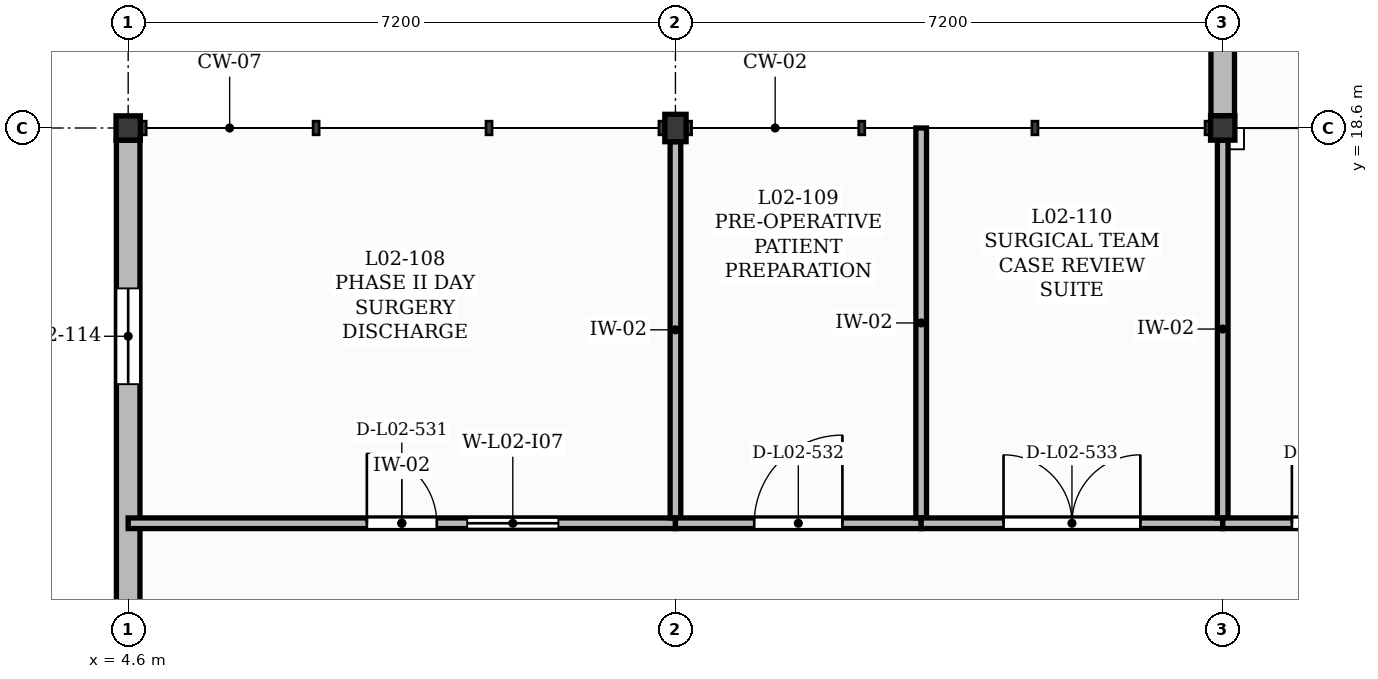
"""IFC4 building model, lengths in metres.
Left out: names, types, materials, properties, quantities, classifications, styles, units other than length and angle.
Written with IfcOpenShell. Run it as: python <this file> out.ifc"""

import sys

from ifc_helpers import new_model, si_unit, direction, frame, frame_2d, origin, origin_2d, place, context, subcontext, project, spatial, rectangle, extrude, element, fill, save


model = new_model("IFC4")
c1 = context("Model", 3, precision=1e-05, world=origin(), true_north=direction((0.0, 1.0)))
c2 = subcontext(c1, "Body", "Model", "MODEL_VIEW")
j1 = project(units=[si_unit("LENGTHUNIT", "METRE"), si_unit("PLANEANGLEUNIT", "RADIAN")], contexts=[c1])
p1 = place(None, origin())
s1 = spatial("IfcSite", under=j1, at=p1, CompositionType="ELEMENT")
p2 = place(p1, origin())
s2 = spatial("IfcBuilding", under=s1, at=p2, CompositionType="ELEMENT")
p3 = place(p2, frame((0.0, 0.0, 9.0)))
s3 = spatial("IfcBuildingStorey", under=s2, at=p3, CompositionType="ELEMENT", Elevation=9.0)
p4 = place(p3, frame((4.6, 18.6, 0.0), z_axis=(0.0, 0.0, 1.0), x_axis=(1.0, 0.0, 0.0)))
e1 = element("IfcColumn", 1, at=p4, inside=s3, PredefinedType="COLUMN", context=c2, shape_type="SweptSolid", body=[
    extrude(rectangle(XDim=0.32, YDim=0.32, at=origin_2d()), origin(), (0.0, 0.0, 1.0), 3.95),
])
p5 = place(p3, frame((11.8, 18.6, 0.0), z_axis=(0.0, 0.0, 1.0), x_axis=(1.0, 0.0, 0.0)))
e2 = element("IfcColumn", 2, at=p5, inside=s3, PredefinedType="COLUMN", context=c2, shape_type="SweptSolid", body=[
    extrude(rectangle(XDim=0.28, YDim=0.36, at=origin_2d()), origin(), (0.0, 0.0, 1.0), 3.95),
])
p6 = place(p3, frame((19.0, 18.6, 0.0), z_axis=(0.0, 0.0, 1.0), x_axis=(1.0, 0.0, 0.0)))
e3 = element("IfcColumn", 3, at=p6, inside=s3, PredefinedType="COLUMN", context=c2, shape_type="SweptSolid", body=[
    extrude(rectangle(XDim=0.32, YDim=0.32, at=origin_2d()), origin(), (0.0, 0.0, 1.0), 3.95),
])
p7 = place(p3, frame((4.6, 11.58, 0.0), z_axis=(0.0, 0.0, 1.0), x_axis=(0.0, 1.0, 0.0)))
e4 = element("IfcWall", 4, at=p7, inside=s3, PredefinedType="SOLIDWALL", context=c2, shape_type="SweptSolid", body=[
    extrude(rectangle(XDim=6.86, YDim=0.31, at=frame_2d((3.43, 0.0))), origin(), (0.0, 0.0, 1.0), 3.49),
])
p8 = place(p7, frame((3.65, 0.0, 1.05)))
e5 = element("IfcOpeningElement", 5, at=p8, cuts=e4, PredefinedType="OPENING", context=c2, shape_type="SweptSolid", body=[
    extrude(rectangle(XDim=1.26, YDim=1.65, at=frame_2d((0.63, 0.825))), frame((0.0, 0.165, 0.0), z_axis=(0.0, -1.0, 0.0), x_axis=(1.0, 0.0, 0.0)), (0.0, 0.0, 1.0), 0.33),
])
p9 = place(p3, frame((19.0, 18.76, 0.0), z_axis=(0.0, 0.0, 1.0), x_axis=(0.0, 1.0, 0.0)))
e6 = element("IfcWall", 6, at=p9, inside=s3, PredefinedType="SOLIDWALL", context=c2, shape_type="SweptSolid", body=[
    extrude(rectangle(XDim=8.26, YDim=0.31, at=frame_2d((4.13, 0.0))), origin(), (0.0, 0.0, 1.0), 3.49),
])
p10 = place(p9, frame((2.54, 0.0, 1.35)))
e7 = element("IfcOpeningElement", 7, at=p10, cuts=e6, PredefinedType="OPENING", context=c2, shape_type="SweptSolid", body=[
    extrude(rectangle(XDim=1.25, YDim=1.4, at=frame_2d((0.625, 0.7))), frame((0.0, 0.165, 0.0), z_axis=(0.0, -1.0, 0.0), x_axis=(1.0, 0.0, 0.0)), (0.0, 0.0, 1.0), 0.33),
])
p11 = place(p9, frame((4.47, 0.0, 1.35)))
e8 = element("IfcOpeningElement", 8, at=p11, cuts=e6, PredefinedType="OPENING", context=c2, shape_type="SweptSolid", body=[
    extrude(rectangle(XDim=1.25, YDim=1.4, at=frame_2d((0.625, 0.7))), frame((0.0, 0.165, 0.0), z_axis=(0.0, -1.0, 0.0), x_axis=(1.0, 0.0, 0.0)), (0.0, 0.0, 1.0), 0.33),
])
p12 = place(p3, frame((4.6, 13.4, 0.0), z_axis=(0.0, 0.0, 1.0), x_axis=(1.0, 0.0, 0.0)))
e9 = element("IfcWall", 9, at=p12, inside=s3, PredefinedType="PARTITIONING", context=c2, shape_type="SweptSolid", body=[
    extrude(rectangle(XDim=7.2, YDim=0.14, at=frame_2d((3.6, 0.0))), origin(), (0.0, 0.0, 1.0), 3.91),
])
p13 = place(p12, frame((3.14, 0.0, 0.0)))
e10 = element("IfcOpeningElement", 10, at=p13, cuts=e9, PredefinedType="OPENING", context=c2, shape_type="SweptSolid", body=[
    extrude(rectangle(XDim=0.92, YDim=2.1, at=frame_2d((0.46, 1.05))), frame((0.0, 0.08, 0.0), z_axis=(0.0, -1.0, 0.0), x_axis=(1.0, 0.0, 0.0)), (0.0, 0.0, 1.0), 0.16),
])
p14 = place(p12, frame((4.46, 0.0, 1.05)))
e11 = element("IfcOpeningElement", 11, at=p14, cuts=e9, PredefinedType="OPENING", context=c2, shape_type="SweptSolid", body=[
    extrude(rectangle(XDim=1.2, YDim=1.1, at=frame_2d((0.6, 0.55))), frame((0.0, 0.08, 0.0), z_axis=(0.0, -1.0, 0.0), x_axis=(1.0, 0.0, 0.0)), (0.0, 0.0, 1.0), 0.16),
])
p15 = place(p3, frame((11.8, 13.47, 0.0), z_axis=(0.0, 0.0, 1.0), x_axis=(0.0, 1.0, 0.0)))
e12 = element("IfcWall", 12, at=p15, inside=s3, PredefinedType="PARTITIONING", context=c2, shape_type="SweptSolid", body=[
    extrude(rectangle(XDim=4.95, YDim=0.14, at=frame_2d((2.475, 0.0))), origin(), (0.0, 0.0, 1.0), 3.49),
])
p16 = place(p3, frame((11.8, 13.4, 0.0), z_axis=(0.0, 0.0, 1.0), x_axis=(1.0, 0.0, 0.0)))
e13 = element("IfcWall", 13, at=p16, inside=s3, PredefinedType="PARTITIONING", context=c2, shape_type="SweptSolid", body=[
    extrude(rectangle(XDim=3.233, YDim=0.14, at=frame_2d((1.616, 0.0))), origin(), (0.0, 0.0, 1.0), 3.91),
])
p17 = place(p16, frame((1.037, 0.0, 0.0)))
e14 = element("IfcOpeningElement", 14, at=p17, cuts=e13, PredefinedType="OPENING", context=c2, shape_type="SweptSolid", body=[
    extrude(rectangle(XDim=1.16, YDim=2.1, at=frame_2d((0.58, 1.05))), frame((0.0, 0.08, 0.0), z_axis=(0.0, -1.0, 0.0), x_axis=(1.0, 0.0, 0.0)), (0.0, 0.0, 1.0), 0.16),
])
p18 = place(p3, frame((15.033, 13.47, 0.0), z_axis=(0.0, 0.0, 1.0), x_axis=(0.0, 1.0, 0.0)))
e15 = element("IfcWall", 15, at=p18, inside=s3, PredefinedType="PARTITIONING", context=c2, shape_type="SweptSolid", body=[
    extrude(rectangle(XDim=5.13, YDim=0.14, at=frame_2d((2.565, 0.0))), origin(), (0.0, 0.0, 1.0), 3.91),
])
p19 = place(p3, frame((15.033, 13.4, 0.0), z_axis=(0.0, 0.0, 1.0), x_axis=(1.0, 0.0, 0.0)))
e16 = element("IfcWall", 16, at=p19, inside=s3, PredefinedType="PARTITIONING", context=c2, shape_type="SweptSolid", body=[
    extrude(rectangle(XDim=3.967, YDim=0.14, at=frame_2d((1.983, 0.0))), origin(), (0.0, 0.0, 1.0), 3.91),
])
p20 = place(p19, frame((1.083, 0.0, 0.0)))
e17 = element("IfcOpeningElement", 17, at=p20, cuts=e16, PredefinedType="OPENING", context=c2, shape_type="SweptSolid", body=[
    extrude(rectangle(XDim=1.8, YDim=2.3, at=frame_2d((0.9, 1.15))), frame((0.0, 0.08, 0.0), z_axis=(0.0, -1.0, 0.0), x_axis=(1.0, 0.0, 0.0)), (0.0, 0.0, 1.0), 0.16),
])
p21 = place(p3, frame((19.0, 13.47, 0.0), z_axis=(0.0, 0.0, 1.0), x_axis=(0.0, 1.0, 0.0)))
e18 = element("IfcWall", 18, at=p21, inside=s3, PredefinedType="PARTITIONING", context=c2, shape_type="SweptSolid", body=[
    extrude(rectangle(XDim=4.97, YDim=0.14, at=frame_2d((2.485, 0.0))), origin(), (0.0, 0.0, 1.0), 3.49),
])
p22 = place(p3, frame((19.0, 13.4, 0.0), z_axis=(0.0, 0.0, 1.0), x_axis=(1.0, 0.0, 0.0)))
e19 = element("IfcWall", 19, at=p22, inside=s3, PredefinedType="PARTITIONING", context=c2, shape_type="SweptSolid", body=[
    extrude(rectangle(XDim=2.8, YDim=0.14, at=frame_2d((1.4, 0.0))), origin(), (0.0, 0.0, 1.0), 3.96),
])
p23 = place(p22, frame((0.91, 0.0, 0.0)))
e20 = element("IfcOpeningElement", 20, at=p23, cuts=e19, PredefinedType="OPENING", context=c2, shape_type="SweptSolid", body=[
    extrude(rectangle(XDim=0.98, YDim=2.15, at=frame_2d((0.49, 1.075))), frame((0.0, 0.08, 0.0), z_axis=(0.0, -1.0, 0.0), x_axis=(1.0, 0.0, 0.0)), (0.0, 0.0, 1.0), 0.16),
])
p24 = place(p8, origin())
e21 = element("IfcWindow", 21, at=p24, inside=s3, PartitioningType="SINGLE_PANEL", PredefinedType="WINDOW", context=c2, shape_type="SweptSolid", body=[
    extrude(rectangle(XDim=1.26, YDim=1.65, at=frame_2d((0.63, 0.825))), frame((0.0, 0.03, 0.0), z_axis=(0.0, -1.0, 0.0), x_axis=(1.0, 0.0, 0.0)), (0.0, 0.0, 1.0), 0.06),
])
fill(e5, e21)
p25 = place(p23, origin())
e22 = element("IfcDoor", 22, at=p25, inside=s3, OperationType="SINGLE_SWING_LEFT", PredefinedType="DOOR", context=c2, shape_type="SweptSolid", body=[
    extrude(rectangle(XDim=0.98, YDim=2.15, at=frame_2d((0.49, 1.075))), frame((0.0, 0.025, 0.0), z_axis=(0.0, -1.0, 0.0), x_axis=(1.0, 0.0, 0.0)), (0.0, 0.0, 1.0), 0.05),
])
fill(e20, e22)
p26 = place(p13, origin())
e23 = element("IfcDoor", 23, at=p26, inside=s3, OperationType="SINGLE_SWING_LEFT", PredefinedType="DOOR", context=c2, shape_type="SweptSolid", body=[
    extrude(rectangle(XDim=0.92, YDim=2.1, at=frame_2d((0.46, 1.05))), frame((0.0, 0.025, 0.0), z_axis=(0.0, -1.0, 0.0), x_axis=(1.0, 0.0, 0.0)), (0.0, 0.0, 1.0), 0.05),
])
fill(e10, e23)
p27 = place(p14, origin())
e24 = element("IfcWindow", 24, at=p27, inside=s3, PartitioningType="SINGLE_PANEL", PredefinedType="WINDOW", context=c2, shape_type="SweptSolid", body=[
    extrude(rectangle(XDim=1.2, YDim=1.1, at=frame_2d((0.6, 0.55))), frame((0.0, 0.03, 0.0), z_axis=(0.0, -1.0, 0.0), x_axis=(1.0, 0.0, 0.0)), (0.0, 0.0, 1.0), 0.06),
])
fill(e11, e24)
p28 = place(p17, origin())
e25 = element("IfcDoor", 25, at=p28, inside=s3, OperationType="SINGLE_SWING_RIGHT", PredefinedType="DOOR", context=c2, shape_type="SweptSolid", body=[
    extrude(rectangle(XDim=1.16, YDim=2.1, at=frame_2d((0.58, 1.05))), frame((0.0, 0.025, 0.0), z_axis=(0.0, -1.0, 0.0), x_axis=(1.0, 0.0, 0.0)), (0.0, 0.0, 1.0), 0.05),
])
fill(e14, e25)
p29 = place(p20, origin())
e26 = element("IfcDoor", 26, at=p29, inside=s3, OperationType="DOUBLE_DOOR_SINGLE_SWING", PredefinedType="DOOR", context=c2, shape_type="SweptSolid", body=[
    extrude(rectangle(XDim=1.8, YDim=2.3, at=frame_2d((0.9, 1.15))), frame((0.0, 0.025, 0.0), z_axis=(0.0, -1.0, 0.0), x_axis=(1.0, 0.0, 0.0)), (0.0, 0.0, 1.0), 0.05),
])
fill(e17, e26)
save(model, sys.argv[1])
